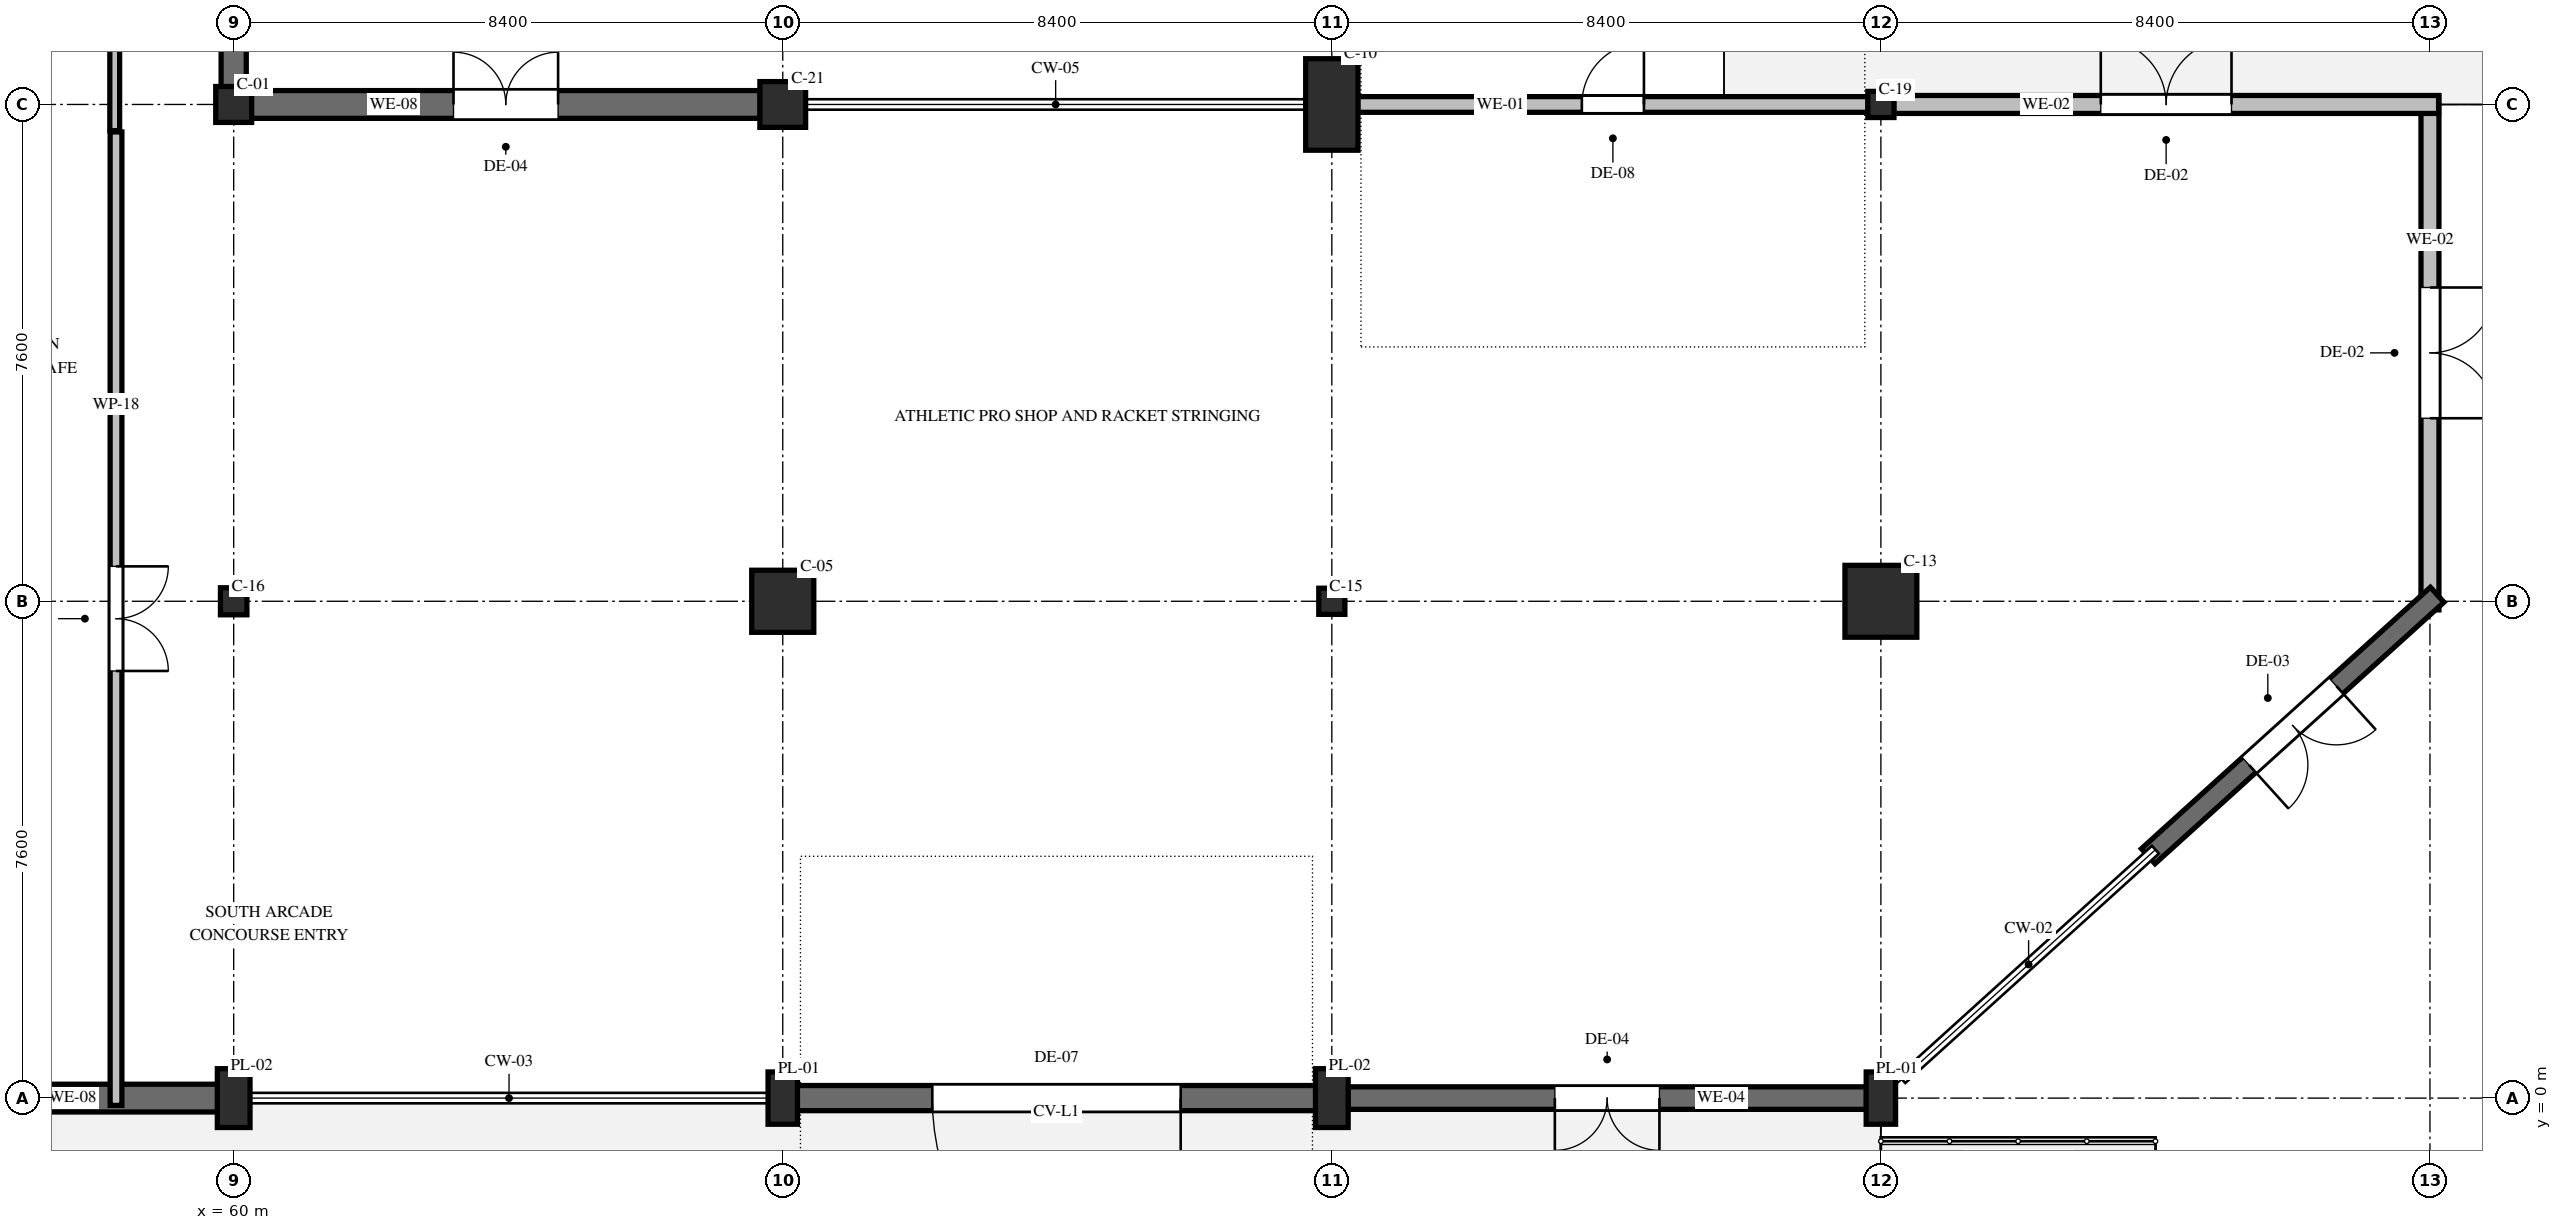
"""IFC4 building model, lengths in metres.
Left out: names, types, materials, properties, quantities, classifications, styles, units other than length and angle.
Written with IfcOpenShell. Run it as: python <this file> out.ifc"""

import sys

from ifc_helpers import new_model, si_unit, direction, frame, frame_2d, origin, origin_2d, place, context, subcontext, project, spatial, rectangle, hollow_rectangle, circle, i_section, extrude, element, fill, save


model = new_model("IFC4")
c1 = context("Model", 3, precision=1e-05, world=origin(), true_north=direction((0.0, 1.0)))
c2 = subcontext(c1, "Body", "Model", "MODEL_VIEW")
j1 = project(units=[si_unit("LENGTHUNIT", "METRE"), si_unit("PLANEANGLEUNIT", "RADIAN")], contexts=[c1])
p1 = place(None, origin())
s1 = spatial("IfcSite", under=j1, at=p1, CompositionType="ELEMENT")
p2 = place(p1, origin())
s2 = spatial("IfcBuilding", under=s1, at=p2, CompositionType="ELEMENT")
p3 = place(p2, origin())
s3 = spatial("IfcBuildingStorey", under=s2, at=p3, CompositionType="ELEMENT", Elevation=0.0)
p4 = place(p3, frame((60.0, 0.0, 0.0), z_axis=(0.0, 0.0, 1.0), x_axis=(1.0, 0.0, 0.0)))
e1 = element("IfcColumn", 1, at=p4, inside=s3, PredefinedType="PILASTER", context=c2, shape_type="SweptSolid", body=[
    extrude(rectangle(XDim=0.5, YDim=0.9, at=origin_2d()), origin(), (0.0, 0.0, 1.0), 5.4),
])
p5 = place(p3, frame((68.4, 0.0, 0.0), z_axis=(0.0, 0.0, 1.0), x_axis=(1.0, 0.0, 0.0)))
e2 = element("IfcColumn", 2, at=p5, inside=s3, PredefinedType="PILASTER", context=c2, shape_type="SweptSolid", body=[
    extrude(rectangle(XDim=0.45, YDim=0.8, at=origin_2d()), origin(), (0.0, 0.0, 1.0), 5.4),
])
p6 = place(p3, frame((76.8, 0.0, 0.0), z_axis=(0.0, 0.0, 1.0), x_axis=(1.0, 0.0, 0.0)))
e3 = element("IfcColumn", 3, at=p6, inside=s3, PredefinedType="PILASTER", context=c2, shape_type="SweptSolid", body=[
    extrude(rectangle(XDim=0.5, YDim=0.9, at=origin_2d()), origin(), (0.0, 0.0, 1.0), 5.4),
])
p7 = place(p3, frame((85.2, 0.0, 0.0), z_axis=(0.0, 0.0, 1.0), x_axis=(1.0, 0.0, 0.0)))
e4 = element("IfcColumn", 4, at=p7, inside=s3, PredefinedType="PILASTER", context=c2, shape_type="SweptSolid", body=[
    extrude(rectangle(XDim=0.45, YDim=0.8, at=origin_2d()), origin(), (0.0, 0.0, 1.0), 5.4),
])
p8 = place(p3, frame((60.0, 7.6, 0.0), z_axis=(0.0, 0.0, 1.0), x_axis=(1.0, 0.0, 0.0)))
e5 = element("IfcColumn", 5, at=p8, inside=s3, PredefinedType="COLUMN", context=c2, shape_type="SweptSolid", body=[
    extrude(i_section(OverallWidth=0.405, OverallDepth=0.414, WebThickness=0.018, FlangeThickness=0.028, FilletRadius=0.022, at=origin_2d()), origin(), (0.0, 0.0, 1.0), 5.4),
])
p9 = place(p3, frame((60.0, 15.2, 0.0), z_axis=(0.0, 0.0, 1.0), x_axis=(1.0, 0.0, 0.0)))
e6 = element("IfcColumn", 6, at=p9, inside=s3, PredefinedType="COLUMN", context=c2, shape_type="SweptSolid", body=[
    extrude(rectangle(XDim=0.55, YDim=0.55, at=origin_2d()), origin(), (0.0, 0.0, 1.0), 5.4),
])
p10 = place(p3, frame((68.4, 7.6, 0.0), z_axis=(0.0, 0.0, 1.0), x_axis=(1.0, 0.0, 0.0)))
e7 = element("IfcColumn", 7, at=p10, inside=s3, PredefinedType="COLUMN", context=c2, shape_type="SweptSolid", body=[
    extrude(rectangle(XDim=0.95, YDim=0.95, at=origin_2d()), origin(), (0.0, 0.0, 1.0), 5.4),
])
p11 = place(p3, frame((68.4, 15.2, 0.0), z_axis=(0.0, 0.0, 1.0), x_axis=(1.0, 0.0, 0.0)))
e8 = element("IfcColumn", 8, at=p11, inside=s3, PredefinedType="COLUMN", context=c2, shape_type="SweptSolid", body=[
    extrude(hollow_rectangle(XDim=0.7, YDim=0.7, WallThickness=0.028, InnerFilletRadius=0.028, OuterFilletRadius=0.056, at=origin_2d()), origin(), (0.0, 0.0, 1.0), 5.4),
])
p12 = place(p3, frame((76.8, 7.6, 0.0), z_axis=(0.0, 0.0, 1.0), x_axis=(1.0, 0.0, 0.0)))
e9 = element("IfcColumn", 9, at=p12, inside=s3, PredefinedType="COLUMN", context=c2, shape_type="SweptSolid", body=[
    extrude(i_section(OverallWidth=0.4, OverallDepth=0.4, WebThickness=0.013, FlangeThickness=0.021, FilletRadius=0.022, at=origin_2d()), origin(), (0.0, 0.0, 1.0), 5.4),
])
p13 = place(p3, frame((76.8, 15.2, 0.0), z_axis=(0.0, 0.0, 1.0), x_axis=(1.0, 0.0, 0.0)))
e10 = element("IfcColumn", 10, at=p13, inside=s3, PredefinedType="COLUMN", context=c2, shape_type="SweptSolid", body=[
    extrude(rectangle(XDim=0.8, YDim=1.4, at=origin_2d()), origin(), (0.0, 0.0, 1.0), 5.4),
])
p14 = place(p3, frame((85.2, 7.6, 0.0), z_axis=(0.0, 0.0, 1.0), x_axis=(1.0, 0.0, 0.0)))
e11 = element("IfcColumn", 11, at=p14, inside=s3, PredefinedType="COLUMN", context=c2, shape_type="SweptSolid", body=[
    extrude(circle(Radius=0.55, at=origin_2d()), origin(), (0.0, 0.0, 1.0), 5.4),
])
p15 = place(p3, frame((85.2, 15.2, 0.0), z_axis=(0.0, 0.0, 1.0), x_axis=(1.0, 0.0, 0.0)))
e12 = element("IfcColumn", 12, at=p15, inside=s3, PredefinedType="COLUMN", context=c2, shape_type="SweptSolid", body=[
    extrude(hollow_rectangle(XDim=0.4, YDim=0.4, WallThickness=0.019, InnerFilletRadius=0.019, OuterFilletRadius=0.038, at=origin_2d()), origin(), (0.0, 0.0, 1.0), 5.4),
])
p16 = place(p3, frame((93.6, 15.332, 0.0), z_axis=(0.0, 0.0, 1.0), x_axis=(0.0, -1.0, 0.0)))
e13 = element("IfcWall", 13, at=p16, inside=s3, PredefinedType="SOLIDWALL", context=c2, shape_type="SweptSolid", body=[
    extrude(rectangle(XDim=7.864, YDim=0.275, at=frame_2d((3.932, 0.0))), origin(), (0.0, 0.0, 1.0), 5.1),
])
p17 = place(p16, frame((2.932, 0.0, 0.0)))
e14 = element("IfcOpeningElement", 14, at=p17, cuts=e13, PredefinedType="OPENING", context=c2, shape_type="SweptSolid", body=[
    extrude(rectangle(XDim=2.0, YDim=2.3, at=frame_2d((1.0, 1.15))), frame((0.0, 0.147, 0.0), z_axis=(0.0, -1.0, 0.0), x_axis=(1.0, 0.0, 0.0)), (0.0, 0.0, 1.0), 0.295),
])
p18 = place(p3, frame((93.71, 7.7, 0.0), z_axis=(0.0, 0.0, 1.0), x_axis=(-0.741528017063, -0.670921902989, 0.0)))
e15 = element("IfcWall", 15, at=p18, inside=s3, PredefinedType="SOLIDWALL", context=c2, shape_type="SweptSolid", body=[
    extrude(rectangle(XDim=5.961, YDim=0.31, at=frame_2d((2.98, 0.0))), origin(), (0.0, 0.0, 1.0), 5.1),
])
p19 = place(p18, frame((2.081, 0.0, 0.0)))
e16 = element("IfcOpeningElement", 16, at=p19, cuts=e15, PredefinedType="OPENING", context=c2, shape_type="SweptSolid", body=[
    extrude(rectangle(XDim=1.8, YDim=2.25, at=frame_2d((0.9, 1.125))), frame((0.0, 0.165, 0.0), z_axis=(0.0, -1.0, 0.0), x_axis=(1.0, 0.0, 0.0)), (0.0, 0.0, 1.0), 0.33),
])
p20 = place(p3, frame((84.979, 0.0, 0.0), z_axis=(0.0, 0.0, 1.0), x_axis=(-1.0, 0.0, 0.0)))
e17 = element("IfcWall", 17, at=p20, inside=s3, PredefinedType="SOLIDWALL", context=c2, shape_type="SweptSolid", body=[
    extrude(rectangle(XDim=7.933, YDim=0.345, at=frame_2d((3.967, 0.0))), origin(), (0.0, 0.0, 1.0), 5.1),
])
p21 = place(p20, frame((3.167, 0.0, 0.0)))
e18 = element("IfcOpeningElement", 18, at=p21, cuts=e17, PredefinedType="OPENING", context=c2, shape_type="SweptSolid", body=[
    extrude(rectangle(XDim=1.6, YDim=2.2, at=frame_2d((0.8, 1.1))), frame((0.0, 0.182, 0.0), z_axis=(0.0, -1.0, 0.0), x_axis=(1.0, 0.0, 0.0)), (0.0, 0.0, 1.0), 0.365),
])
p22 = place(p3, frame((76.554, 0.0, 0.0), z_axis=(0.0, 0.0, 1.0), x_axis=(-1.0, 0.0, 0.0)))
e19 = element("IfcWall", 19, at=p22, inside=s3, PredefinedType="SOLIDWALL", context=c2, shape_type="SweptSolid", body=[
    extrude(rectangle(XDim=7.933, YDim=0.385, at=frame_2d((3.966, 0.0))), origin(), (0.0, 0.0, 1.0), 5.1),
])
p23 = place(p22, frame((2.066, 0.0, 0.0)))
e20 = element("IfcOpeningElement", 20, at=p23, cuts=e19, PredefinedType="OPENING", context=c2, shape_type="SweptSolid", body=[
    extrude(rectangle(XDim=3.8, YDim=3.2, at=frame_2d((1.9, 1.6))), frame((0.0, 0.202, 0.0), z_axis=(0.0, -1.0, 0.0), x_axis=(1.0, 0.0, 0.0)), (0.0, 0.0, 1.0), 0.405),
])
p24 = place(p3, frame((59.754, 0.0, 0.0), z_axis=(0.0, 0.0, 1.0), x_axis=(-1.0, 0.0, 0.0)))
e21 = element("IfcWall", 21, at=p24, inside=s3, PredefinedType="SOLIDWALL", context=c2, shape_type="SweptSolid", body=[
    extrude(rectangle(XDim=7.933, YDim=0.425, at=frame_2d((3.966, 0.0))), origin(), (0.0, 0.0, 1.0), 5.1),
])
p25 = place(p24, frame((3.491, 0.0, 0.0)))
e22 = element("IfcOpeningElement", 22, at=p25, cuts=e21, PredefinedType="OPENING", context=c2, shape_type="SweptSolid", body=[
    extrude(rectangle(XDim=0.95, YDim=2.15, at=frame_2d((0.475, 1.075))), frame((0.0, 0.222, 0.0), z_axis=(0.0, -1.0, 0.0), x_axis=(1.0, 0.0, 0.0)), (0.0, 0.0, 1.0), 0.445),
])
p26 = place(p3, frame((60.0, 22.59, 0.0), z_axis=(0.0, 0.0, 1.0), x_axis=(0.0, -1.0, 0.0)))
e23 = element("IfcWall", 23, at=p26, inside=s3, PredefinedType="SOLIDWALL", context=c2, shape_type="SweptSolid", body=[
    extrude(rectangle(XDim=7.119, YDim=0.385, at=frame_2d((3.56, 0.0))), origin(), (0.0, 0.0, 1.0), 2.963),
])
p27 = place(p26, frame((2.659, 0.0, 0.0)))
e24 = element("IfcOpeningElement", 24, at=p27, cuts=e23, PredefinedType="OPENING", context=c2, shape_type="SweptSolid", body=[
    extrude(rectangle(XDim=1.8, YDim=2.25, at=frame_2d((0.9, 1.125))), frame((0.0, 0.202, 0.0), z_axis=(0.0, -1.0, 0.0), x_axis=(1.0, 0.0, 0.0)), (0.0, 0.0, 1.0), 0.405),
])
p28 = place(p3, frame((60.271, 15.2, 0.0), z_axis=(0.0, 0.0, 1.0), x_axis=(1.0, 0.0, 0.0)))
e25 = element("IfcWall", 25, at=p28, inside=s3, PredefinedType="SOLIDWALL", context=c2, shape_type="SweptSolid", body=[
    extrude(rectangle(XDim=7.783, YDim=0.425, at=frame_2d((3.892, 0.0))), origin(), (0.0, 0.0, 1.0), 4.38),
])
p29 = place(p28, frame((3.092, 0.0, 0.0)))
e26 = element("IfcOpeningElement", 26, at=p29, cuts=e25, PredefinedType="OPENING", context=c2, shape_type="SweptSolid", body=[
    extrude(rectangle(XDim=1.6, YDim=2.2, at=frame_2d((0.8, 1.1))), frame((0.0, 0.222, 0.0), z_axis=(0.0, -1.0, 0.0), x_axis=(1.0, 0.0, 0.0)), (0.0, 0.0, 1.0), 0.445),
])
p30 = place(p3, frame((77.196, 15.2, 0.0), z_axis=(0.0, 0.0, 1.0), x_axis=(1.0, 0.0, 0.0)))
e27 = element("IfcWall", 27, at=p30, inside=s3, PredefinedType="SOLIDWALL", context=c2, shape_type="SweptSolid", body=[
    extrude(rectangle(XDim=7.808, YDim=0.24, at=frame_2d((3.904, 0.0))), origin(), (0.0, 0.0, 1.0), 4.078),
])
p31 = place(p30, frame((3.429, 0.0, 0.0)))
e28 = element("IfcOpeningElement", 28, at=p31, cuts=e27, PredefinedType="OPENING", context=c2, shape_type="SweptSolid", body=[
    extrude(rectangle(XDim=0.95, YDim=2.15, at=frame_2d((0.475, 1.075))), frame((0.0, 0.13, 0.0), z_axis=(0.0, -1.0, 0.0), x_axis=(1.0, 0.0, 0.0)), (0.0, 0.0, 1.0), 0.26),
])
p32 = place(p3, frame((85.396, 15.2, 0.0), z_axis=(0.0, 0.0, 1.0), x_axis=(1.0, 0.0, 0.0)))
e29 = element("IfcWall", 29, at=p32, inside=s3, PredefinedType="SOLIDWALL", context=c2, shape_type="SweptSolid", body=[
    extrude(rectangle(XDim=8.336, YDim=0.275, at=frame_2d((4.168, 0.0))), origin(), (0.0, 0.0, 1.0), 4.078),
])
p33 = place(p32, frame((3.168, 0.0, 0.0)))
e30 = element("IfcOpeningElement", 30, at=p33, cuts=e29, PredefinedType="OPENING", context=c2, shape_type="SweptSolid", body=[
    extrude(rectangle(XDim=2.0, YDim=2.3, at=frame_2d((1.0, 1.15))), frame((0.0, 0.147, 0.0), z_axis=(0.0, -1.0, 0.0), x_axis=(1.0, 0.0, 0.0)), (0.0, 0.0, 1.0), 0.295),
])
p34 = place(p3, frame((58.18, 22.8, 0.0), z_axis=(0.0, 0.0, 1.0), x_axis=(0.0, -1.0, 0.0)))
e31 = element("IfcWall", 31, at=p34, inside=s3, PredefinedType="PARTITIONING", context=c2, shape_type="SweptSolid", body=[
    extrude(rectangle(XDim=8.0, YDim=0.15, at=frame_2d((4.0, 0.0))), origin(), (0.0, 0.0, 1.0), 2.965),
])
p35 = place(p3, frame((58.2, 14.78, 0.0), z_axis=(0.0, 0.0, 1.0), x_axis=(0.0, -1.0, 0.0)))
e32 = element("IfcWall", 32, at=p35, inside=s3, PredefinedType="PARTITIONING", context=c2, shape_type="SweptSolid", body=[
    extrude(rectangle(XDim=14.892, YDim=0.18, at=frame_2d((7.446, 0.0))), origin(), (0.0, 0.0, 1.0), 4.178),
])
p36 = place(p35, frame((6.646, 0.0, 0.0)))
e33 = element("IfcOpeningElement", 33, at=p36, cuts=e32, PredefinedType="OPENING", context=c2, shape_type="SweptSolid", body=[
    extrude(rectangle(XDim=1.6, YDim=2.2, at=frame_2d((0.8, 1.1))), frame((0.0, 0.1, 0.0), z_axis=(0.0, -1.0, 0.0), x_axis=(1.0, 0.0, 0.0)), (0.0, 0.0, 1.0), 0.2),
])
p37 = place(p17, origin())
e34 = element("IfcDoor", 34, at=p37, inside=s3, OperationType="DOUBLE_DOOR_SINGLE_SWING", PredefinedType="DOOR", context=c2, shape_type="SweptSolid", body=[
    extrude(rectangle(XDim=2.0, YDim=2.3, at=frame_2d((1.0, 1.15))), frame((0.0, 0.025, 0.0), z_axis=(0.0, -1.0, 0.0), x_axis=(1.0, 0.0, 0.0)), (0.0, 0.0, 1.0), 0.05),
])
fill(e14, e34)
p38 = place(p19, origin())
e35 = element("IfcDoor", 35, at=p38, inside=s3, OperationType="DOUBLE_DOOR_SINGLE_SWING", PredefinedType="DOOR", context=c2, shape_type="SweptSolid", body=[
    extrude(rectangle(XDim=1.8, YDim=2.25, at=frame_2d((0.9, 1.125))), frame((0.0, 0.025, 0.0), z_axis=(0.0, -1.0, 0.0), x_axis=(1.0, 0.0, 0.0)), (0.0, 0.0, 1.0), 0.05),
])
fill(e16, e35)
p39 = place(p21, origin())
e36 = element("IfcDoor", 36, at=p39, inside=s3, OperationType="DOUBLE_DOOR_SINGLE_SWING", PredefinedType="DOOR", context=c2, shape_type="SweptSolid", body=[
    extrude(rectangle(XDim=1.6, YDim=2.2, at=frame_2d((0.8, 1.1))), frame((0.0, 0.025, 0.0), z_axis=(0.0, -1.0, 0.0), x_axis=(1.0, 0.0, 0.0)), (0.0, 0.0, 1.0), 0.05),
])
fill(e18, e36)
p40 = place(p23, origin())
e37 = element("IfcDoor", 37, at=p40, inside=s3, OperationType="ROLLINGUP", PredefinedType="DOOR", context=c2, shape_type="SweptSolid", body=[
    extrude(rectangle(XDim=3.8, YDim=3.2, at=frame_2d((1.9, 1.6))), frame((0.0, 0.025, 0.0), z_axis=(0.0, -1.0, 0.0), x_axis=(1.0, 0.0, 0.0)), (0.0, 0.0, 1.0), 0.05),
])
fill(e20, e37)
p41 = place(p29, origin())
e38 = element("IfcDoor", 38, at=p41, inside=s3, OperationType="DOUBLE_DOOR_SINGLE_SWING", PredefinedType="DOOR", context=c2, shape_type="SweptSolid", body=[
    extrude(rectangle(XDim=1.6, YDim=2.2, at=frame_2d((0.8, 1.1))), frame((0.0, 0.025, 0.0), z_axis=(0.0, -1.0, 0.0), x_axis=(1.0, 0.0, 0.0)), (0.0, 0.0, 1.0), 0.05),
])
fill(e26, e38)
p42 = place(p31, origin())
e39 = element("IfcDoor", 39, at=p42, inside=s3, OperationType="SINGLE_SWING_RIGHT", PredefinedType="DOOR", context=c2, shape_type="SweptSolid", body=[
    extrude(rectangle(XDim=0.95, YDim=2.15, at=frame_2d((0.475, 1.075))), frame((0.0, 0.025, 0.0), z_axis=(0.0, -1.0, 0.0), x_axis=(1.0, 0.0, 0.0)), (0.0, 0.0, 1.0), 0.05),
])
fill(e28, e39)
p43 = place(p33, origin())
e40 = element("IfcDoor", 40, at=p43, inside=s3, OperationType="DOUBLE_DOOR_SINGLE_SWING", PredefinedType="DOOR", context=c2, shape_type="SweptSolid", body=[
    extrude(rectangle(XDim=2.0, YDim=2.3, at=frame_2d((1.0, 1.15))), frame((0.0, 0.025, 0.0), z_axis=(0.0, -1.0, 0.0), x_axis=(1.0, 0.0, 0.0)), (0.0, 0.0, 1.0), 0.05),
])
fill(e30, e40)
p44 = place(p36, origin())
e41 = element("IfcDoor", 41, at=p44, inside=s3, OperationType="DOUBLE_DOOR_SINGLE_SWING", PredefinedType="DOOR", context=c2, shape_type="SweptSolid", body=[
    extrude(rectangle(XDim=1.6, YDim=2.2, at=frame_2d((0.8, 1.1))), frame((0.0, 0.025, 0.0), z_axis=(0.0, -1.0, 0.0), x_axis=(1.0, 0.0, 0.0)), (0.0, 0.0, 1.0), 0.05),
])
fill(e33, e41)
save(model, sys.argv[1])
